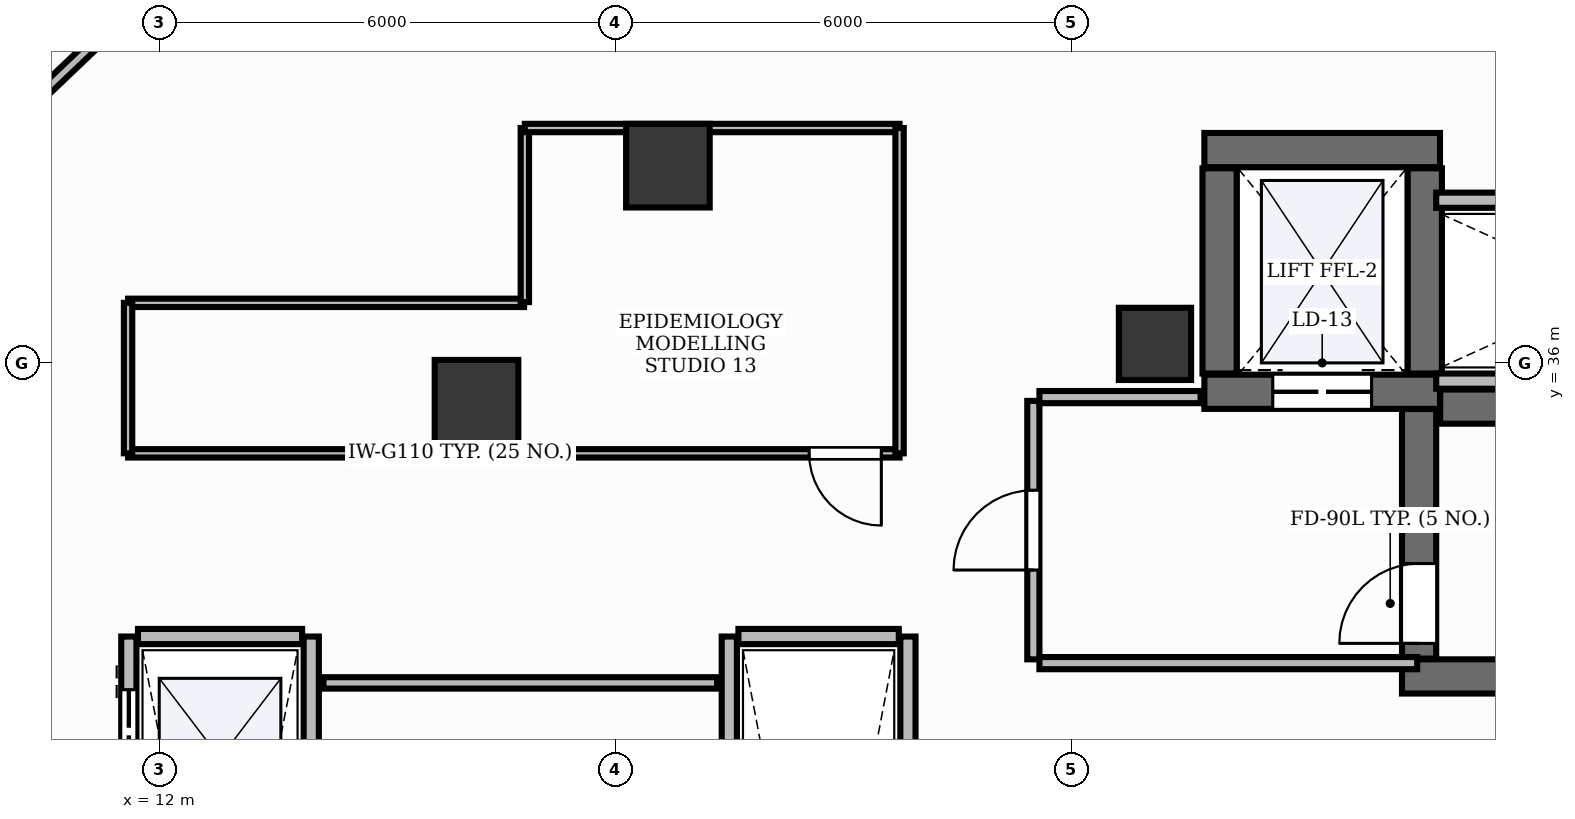
"""IFC4 building model, lengths in metres.
Left out: names, types, materials, properties, quantities, classifications, styles, units other than length and angle.
Written with IfcOpenShell. Run it as: python <this file> out.ifc"""

import sys

from ifc_helpers import new_model, si_unit, direction, frame, frame_2d, origin, origin_2d, place, context, subcontext, project, spatial, rectangle, extrude, element, fill, save


model = new_model("IFC4")
c1 = context("Model", 3, precision=1e-05, world=origin(), true_north=direction((0.0, 1.0)))
c2 = subcontext(c1, "Body", "Model", "MODEL_VIEW")
j1 = project(units=[si_unit("LENGTHUNIT", "METRE"), si_unit("PLANEANGLEUNIT", "RADIAN")], contexts=[c1])
p1 = place(None, origin())
s1 = spatial("IfcSite", under=j1, at=p1, CompositionType="ELEMENT")
p2 = place(p1, origin())
s2 = spatial("IfcBuilding", under=s1, at=p2, CompositionType="ELEMENT")
p3 = place(p2, frame((0.0, 0.0, 72.0)))
s3 = spatial("IfcBuildingStorey", under=s2, at=p3, CompositionType="ELEMENT", Elevation=72.0)
p4 = place(p3, frame((28.852, 35.425, 0.0), z_axis=(0.0, 0.0, 1.0), x_axis=(1.0, 0.0, 0.0)))
e1 = element("IfcWall", 1, at=p4, inside=s3, PredefinedType="SHEAR", context=c2, shape_type="SweptSolid", body=[
    extrude(rectangle(XDim=8.248, YDim=0.45, at=frame_2d((4.124, 0.0))), origin(), (0.0, 0.0, 1.0), 3.9),
])
p5 = place(p3, frame((28.35, 31.875, 0.0), z_axis=(0.0, 0.0, 1.0), x_axis=(1.0, 0.0, 0.0)))
e2 = element("IfcWall", 2, at=p5, inside=s3, PredefinedType="SHEAR", context=c2, shape_type="SweptSolid", body=[
    extrude(rectangle(XDim=8.75, YDim=0.45, at=frame_2d((4.375, 0.0))), origin(), (0.0, 0.0, 1.0), 3.9),
])
p6 = place(p3, frame((28.575, 32.11, 0.0), z_axis=(0.0, 0.0, 1.0), x_axis=(0.0, 1.0, 0.0)))
e3 = element("IfcWall", 3, at=p6, inside=s3, PredefinedType="SHEAR", context=c2, shape_type="SweptSolid", body=[
    extrude(rectangle(XDim=3.283, YDim=0.45, at=frame_2d((1.642, 0.0))), origin(), (0.0, 0.0, 1.0), 3.9),
])
p7 = place(p6, frame((0.2, 0.0, 0.0)))
e4 = element("IfcOpeningElement", 4, at=p7, cuts=e3, PredefinedType="OPENING", context=c2, shape_type="SweptSolid", body=[
    extrude(rectangle(XDim=1.05, YDim=2.15, at=frame_2d((0.525, 1.075))), frame((0.0, 0.24, 0.0), z_axis=(0.0, -1.0, 0.0), x_axis=(1.0, 0.0, 0.0)), (0.0, 0.0, 1.0), 0.48),
])
p8 = place(p3, frame((25.75, 38.8, 0.0), z_axis=(0.0, 0.0, 1.0), x_axis=(1.0, 0.0, 0.0)))
e5 = element("IfcWall", 5, at=p8, inside=s3, PredefinedType="SHEAR", context=c2, shape_type="SweptSolid", body=[
    extrude(rectangle(XDim=3.1, YDim=0.45, at=frame_2d((1.55, 0.0))), origin(), (0.0, 0.0, 1.0), 3.9),
])
p9 = place(p3, frame((25.75, 35.62, 0.0), z_axis=(0.0, 0.0, 1.0), x_axis=(1.0, 0.0, 0.0)))
e6 = element("IfcWall", 6, at=p9, inside=s3, PredefinedType="SHEAR", context=c2, shape_type="SweptSolid", body=[
    extrude(rectangle(XDim=3.1, YDim=0.45, at=frame_2d((1.55, 0.0))), origin(), (0.0, 0.0, 1.0), 3.9),
])
p10 = place(p9, frame((0.9, 0.0, 0.0)))
e7 = element("IfcOpeningElement", 7, at=p10, cuts=e6, PredefinedType="OPENING", context=c2, shape_type="SweptSolid", body=[
    extrude(rectangle(XDim=1.3, YDim=2.2, at=frame_2d((0.65, 1.1))), frame((0.0, 0.24, 0.0), z_axis=(0.0, -1.0, 0.0), x_axis=(1.0, 0.0, 0.0)), (0.0, 0.0, 1.0), 0.48),
])
for number, where, z_axis, x_axis in (
    (8, (25.95, 35.86, 0.0), (0.0, 0.0, 1.0), (0.0, 1.0, 0.0)),
    (9, (28.65, 35.86, 0.0), (0.0, 0.0, 1.0), (0.0, 1.0, 0.0)),
):
    element("IfcWall", number, at=place(p3, frame(where, z_axis=z_axis, x_axis=x_axis)), inside=s3, PredefinedType="SHEAR", context=c2, shape_type="SweptSolid", body=[
        extrude(rectangle(XDim=2.7, YDim=0.45, at=frame_2d((1.35, 0.0))), origin(), (0.0, 0.0, 1.0), 3.9),
    ])
p11 = place(p3, frame((25.1, 36.25, -0.0), z_axis=(0.0, 0.0, 1.0), x_axis=(1.0, 0.0, 0.0)))
e10 = element("IfcColumn", 10, at=p11, inside=s3, PredefinedType="PILASTER", context=c2, shape_type="SweptSolid", body=[
    extrude(rectangle(XDim=0.95, YDim=0.95, at=origin_2d()), origin(), (0.0, 0.0, 1.0), 3.901),
])
for number, where, z_axis, x_axis in (
    (11, (18.692, 38.595, -0.0), (0.0, 0.0, 1.0), (1.0, 0.0, 0.0)),
    (12, (16.174, 35.489, -0.0), (0.0, 0.0, 1.0), (1.0, 0.0, 0.0)),
):
    element("IfcColumn", number, at=place(p3, frame(where, z_axis=z_axis, x_axis=x_axis)), inside=s3, PredefinedType="COLUMN", context=c2, shape_type="SweptSolid", body=[
        extrude(rectangle(XDim=1.1, YDim=1.1, at=origin_2d()), origin(), (0.0, 0.0, 1.0), 3.901),
    ])
p12 = place(p3, frame((11.6, 21.6, 0.0), z_axis=(0.0, 0.0, 1.0), x_axis=(0.0, 1.0, 0.0)))
e13 = element("IfcWall", 13, at=p12, inside=s3, PredefinedType="PARTITIONING", context=c2, shape_type="SweptSolid", body=[
    extrude(rectangle(XDim=10.8, YDim=0.2, at=frame_2d((5.4, 0.0))), origin(), (0.0, 0.0, 1.0), 2.91),
])
p13 = place(p12, frame((0.9, 0.0, 0.0)))
e14 = element("IfcOpeningElement", 14, at=p13, cuts=e13, PredefinedType="OPENING", context=c2, shape_type="SweptSolid", body=[
    extrude(rectangle(XDim=1.1, YDim=2.2, at=frame_2d((0.55, 1.1))), frame((0.0, 0.115, 0.0), z_axis=(0.0, -1.0, 0.0), x_axis=(1.0, 0.0, 0.0)), (0.0, 0.0, 1.0), 0.23),
])
p14 = place(p12, frame((3.6, 0.0, 0.0)))
e15 = element("IfcOpeningElement", 15, at=p14, cuts=e13, PredefinedType="OPENING", context=c2, shape_type="SweptSolid", body=[
    extrude(rectangle(XDim=1.1, YDim=2.2, at=frame_2d((0.55, 1.1))), frame((0.0, 0.115, 0.0), z_axis=(0.0, -1.0, 0.0), x_axis=(1.0, 0.0, 0.0)), (0.0, 0.0, 1.0), 0.23),
])
p15 = place(p12, frame((6.3, 0.0, 0.0)))
e16 = element("IfcOpeningElement", 16, at=p15, cuts=e13, PredefinedType="OPENING", context=c2, shape_type="SweptSolid", body=[
    extrude(rectangle(XDim=1.1, YDim=2.2, at=frame_2d((0.55, 1.1))), frame((0.0, 0.115, 0.0), z_axis=(0.0, -1.0, 0.0), x_axis=(1.0, 0.0, 0.0)), (0.0, 0.0, 1.0), 0.23),
])
p16 = place(p12, frame((9.0, 0.0, 0.0)))
e17 = element("IfcOpeningElement", 17, at=p16, cuts=e13, PredefinedType="OPENING", context=c2, shape_type="SweptSolid", body=[
    extrude(rectangle(XDim=1.1, YDim=2.2, at=frame_2d((0.55, 1.1))), frame((0.0, 0.115, 0.0), z_axis=(0.0, -1.0, 0.0), x_axis=(1.0, 0.0, 0.0)), (0.0, 0.0, 1.0), 0.23),
])
p17 = place(p3, frame((14.0, 21.6, 0.0), z_axis=(0.0, 0.0, 1.0), x_axis=(0.0, 1.0, 0.0)))
e18 = element("IfcWall", 18, at=p17, inside=s3, PredefinedType="PARTITIONING", context=c2, shape_type="SweptSolid", body=[
    extrude(rectangle(XDim=10.8, YDim=0.2, at=frame_2d((5.4, 0.0))), origin(), (0.0, 0.0, 1.0), 2.91),
])
p18 = place(p3, frame((11.72, 32.4, 0.0), z_axis=(0.0, 0.0, 1.0), x_axis=(1.0, 0.0, 0.0)))
e19 = element("IfcWall", 19, at=p18, inside=s3, PredefinedType="PARTITIONING", context=c2, shape_type="SweptSolid", body=[
    extrude(rectangle(XDim=2.16, YDim=0.2, at=frame_2d((1.08, 0.0))), origin(), (0.0, 0.0, 1.0), 2.91),
])
for number, where, z_axis, x_axis in (
    (20, (19.5, 21.6, 0.0), (0.0, 0.0, 1.0), (0.0, 1.0, 0.0)),
    (21, (21.85, 21.6, 0.0), (0.0, 0.0, 1.0), (0.0, 1.0, 0.0)),
):
    element("IfcWall", number, at=place(p3, frame(where, z_axis=z_axis, x_axis=x_axis)), inside=s3, PredefinedType="PARTITIONING", context=c2, shape_type="SweptSolid", body=[
        extrude(rectangle(XDim=10.8, YDim=0.2, at=frame_2d((5.4, 0.0))), origin(), (0.0, 0.0, 1.0), 2.91),
    ])
p19 = place(p3, frame((19.62, 32.4, 0.0), z_axis=(0.0, 0.0, 1.0), x_axis=(1.0, 0.0, 0.0)))
e22 = element("IfcWall", 22, at=p19, inside=s3, PredefinedType="PARTITIONING", context=c2, shape_type="SweptSolid", body=[
    extrude(rectangle(XDim=2.11, YDim=0.2, at=frame_2d((1.055, 0.0))), origin(), (0.0, 0.0, 1.0), 2.91),
])
for number, where, z_axis, x_axis in (
    (23, (28.8, 35.76, 0.0), (0.0, 0.0, 1.0), (1.0, 0.0, 0.0)),
    (24, (28.8, 38.14, 0.0), (0.0, 0.0, 1.0), (1.0, 0.0, 0.0)),
):
    element("IfcWall", number, at=place(p3, frame(where, z_axis=z_axis, x_axis=x_axis)), inside=s3, PredefinedType="PARTITIONING", context=c2, shape_type="SweptSolid", body=[
        extrude(rectangle(XDim=4.57, YDim=0.2, at=frame_2d((2.285, 0.0))), origin(), (0.0, 0.0, 1.0), 2.91),
    ])
p20 = place(p3, frame((23.5, 32.1, 0.0), z_axis=(0.0, 0.0, 1.0), x_axis=(0.0, 1.0, 0.0)))
e25 = element("IfcWall", 25, at=p20, inside=s3, PredefinedType="PARTITIONING", context=c2, shape_type="SweptSolid", body=[
    extrude(rectangle(XDim=3.4, YDim=0.16, at=frame_2d((1.7, 0.0))), origin(), (0.0, 0.0, 1.0), 2.91),
])
p21 = place(p20, frame((1.175, 0.0, 0.0)))
e26 = element("IfcOpeningElement", 26, at=p21, cuts=e25, PredefinedType="OPENING", context=c2, shape_type="SweptSolid", body=[
    extrude(rectangle(XDim=1.05, YDim=2.15, at=frame_2d((0.525, 1.075))), frame((0.0, 0.095, 0.0), z_axis=(0.0, -1.0, 0.0), x_axis=(1.0, 0.0, 0.0)), (0.0, 0.0, 1.0), 0.19),
])
p22 = place(p3, frame((23.58, 32.05, 0.0), z_axis=(0.0, 0.0, 1.0), x_axis=(1.0, 0.0, 0.0)))
e27 = element("IfcWall", 27, at=p22, inside=s3, PredefinedType="PARTITIONING", context=c2, shape_type="SweptSolid", body=[
    extrude(rectangle(XDim=4.97, YDim=0.16, at=frame_2d((2.485, 0.0))), origin(), (0.0, 0.0, 1.0), 2.91),
])
p23 = place(p3, frame((23.58, 35.55, 0.0), z_axis=(0.0, 0.0, 1.0), x_axis=(1.0, 0.0, 0.0)))
e28 = element("IfcWall", 28, at=p23, inside=s3, PredefinedType="PARTITIONING", context=c2, shape_type="SweptSolid", body=[
    extrude(rectangle(XDim=2.12, YDim=0.16, at=frame_2d((1.06, 0.0))), origin(), (0.0, 0.0, 1.0), 2.91),
])
p24 = place(p3, frame((21.74, 34.81, 0.0), z_axis=(0.0, 0.0, 1.0), x_axis=(-1.0, 0.0, 0.0)))
e29 = element("IfcWall", 29, at=p24, inside=s3, PredefinedType="MOVABLE", context=c2, shape_type="SweptSolid", body=[
    extrude(rectangle(XDim=10.15, YDim=0.11, at=frame_2d((5.075, 0.0))), origin(), (0.0, 0.0, 1.0), 2.91),
])
p25 = place(p24, frame((0.24, 0.0, 0.0)))
e30 = element("IfcOpeningElement", 30, at=p25, cuts=e29, PredefinedType="OPENING", context=c2, shape_type="SweptSolid", body=[
    extrude(rectangle(XDim=0.95, YDim=2.15, at=frame_2d((0.475, 1.075))), frame((0.0, 0.07, 0.0), z_axis=(0.0, -1.0, 0.0), x_axis=(1.0, 0.0, 0.0)), (0.0, 0.0, 1.0), 0.14),
])
p26 = place(p3, frame((14.16, 31.79, 0.0), z_axis=(0.0, 0.0, 1.0), x_axis=(1.0, 0.0, 0.0)))
e31 = element("IfcWall", 31, at=p26, inside=s3, PredefinedType="PARTITIONING", context=c2, shape_type="SweptSolid", body=[
    extrude(rectangle(XDim=5.18, YDim=0.15, at=frame_2d((2.59, 0.0))), origin(), (0.0, 0.0, 1.0), 2.91),
])
p27 = place(p3, frame((11.59, 36.79, 0.0), z_axis=(0.0, 0.0, 1.0), x_axis=(1.0, 0.0, 0.0)))
e32 = element("IfcWall", 32, at=p27, inside=s3, PredefinedType="MOVABLE", context=c2, shape_type="SweptSolid", body=[
    extrude(rectangle(XDim=5.21, YDim=0.11, at=frame_2d((2.605, 0.0))), origin(), (0.0, 0.0, 1.0), 2.91),
])
p28 = place(p3, frame((16.81, 36.8, 0.0), z_axis=(0.0, 0.0, 1.0), x_axis=(0.0, 1.0, 0.0)))
e33 = element("IfcWall", 33, at=p28, inside=s3, PredefinedType="MOVABLE", context=c2, shape_type="SweptSolid", body=[
    extrude(rectangle(XDim=2.29, YDim=0.11, at=frame_2d((1.145, 0.0))), origin(), (0.0, 0.0, 1.0), 2.91),
])
p29 = place(p3, frame((16.81, 39.09, 0.0), z_axis=(0.0, 0.0, 1.0), x_axis=(1.0, 0.0, 0.0)))
e34 = element("IfcWall", 34, at=p29, inside=s3, PredefinedType="MOVABLE", context=c2, shape_type="SweptSolid", body=[
    extrude(rectangle(XDim=4.93, YDim=0.11, at=frame_2d((2.465, 0.0))), origin(), (0.0, 0.0, 1.0), 2.91),
])
p30 = place(p3, frame((21.74, 39.09, 0.0), z_axis=(0.0, 0.0, 1.0), x_axis=(0.0, -1.0, 0.0)))
e35 = element("IfcWall", 35, at=p30, inside=s3, PredefinedType="MOVABLE", context=c2, shape_type="SweptSolid", body=[
    extrude(rectangle(XDim=4.28, YDim=0.11, at=frame_2d((2.14, 0.0))), origin(), (0.0, 0.0, 1.0), 2.91),
])
p31 = place(p3, frame((11.59, 34.81, 0.0), z_axis=(0.0, 0.0, 1.0), x_axis=(0.0, 1.0, 0.0)))
e36 = element("IfcWall", 36, at=p31, inside=s3, PredefinedType="MOVABLE", context=c2, shape_type="SweptSolid", body=[
    extrude(rectangle(XDim=1.98, YDim=0.11, at=frame_2d((0.99, 0.0))), origin(), (0.0, 0.0, 1.0), 2.91),
])
p32 = place(p3, frame((11.693, 40.727, 0.0), z_axis=(0.0, 0.0, 1.0), x_axis=(-0.723683526017, -0.690131983154, 0.0)))
e37 = element("IfcWall", 37, at=p32, inside=s3, PredefinedType="PARTITIONING", context=c2, shape_type="SweptSolid", body=[
    extrude(rectangle(XDim=2.94, YDim=0.15, at=frame_2d((1.47, 0.0))), origin(), (0.0, 0.0, 1.0), 2.91),
])
p33 = place(p7, origin())
e38 = element("IfcDoor", 38, at=p33, inside=s3, OperationType="SINGLE_SWING_LEFT", PredefinedType="DOOR", context=c2, shape_type="SweptSolid", body=[
    extrude(rectangle(XDim=1.05, YDim=2.15, at=frame_2d((0.525, 1.075))), frame((0.0, 0.025, 0.0), z_axis=(0.0, -1.0, 0.0), x_axis=(1.0, 0.0, 0.0)), (0.0, 0.0, 1.0), 0.05),
])
fill(e4, e38)
p34 = place(p16, origin())
e39 = element("IfcDoor", 39, at=p34, inside=s3, OperationType="DOUBLE_DOOR_SLIDING", PredefinedType="DOOR", context=c2, shape_type="SweptSolid", body=[
    extrude(rectangle(XDim=1.1, YDim=2.2, at=frame_2d((0.55, 1.1))), frame((0.0, 0.025, 0.0), z_axis=(0.0, -1.0, 0.0), x_axis=(1.0, 0.0, 0.0)), (0.0, 0.0, 1.0), 0.05),
])
fill(e17, e39)
p35 = place(p10, origin())
e40 = element("IfcDoor", 40, at=p35, inside=s3, OperationType="DOUBLE_DOOR_SLIDING", PredefinedType="DOOR", context=c2, shape_type="SweptSolid", body=[
    extrude(rectangle(XDim=1.3, YDim=2.2, at=frame_2d((0.65, 1.1))), frame((0.0, 0.025, 0.0), z_axis=(0.0, -1.0, 0.0), x_axis=(1.0, 0.0, 0.0)), (0.0, 0.0, 1.0), 0.05),
])
fill(e7, e40)
p36 = place(p21, origin())
e41 = element("IfcDoor", 41, at=p36, inside=s3, OperationType="SINGLE_SWING_LEFT", PredefinedType="DOOR", context=c2, shape_type="SweptSolid", body=[
    extrude(rectangle(XDim=1.05, YDim=2.15, at=frame_2d((0.525, 1.075))), frame((0.0, 0.025, 0.0), z_axis=(0.0, -1.0, 0.0), x_axis=(1.0, 0.0, 0.0)), (0.0, 0.0, 1.0), 0.05),
])
fill(e26, e41)
p37 = place(p25, origin())
e42 = element("IfcDoor", 42, at=p37, inside=s3, OperationType="SINGLE_SWING_LEFT", PredefinedType="DOOR", context=c2, shape_type="SweptSolid", body=[
    extrude(rectangle(XDim=0.95, YDim=2.15, at=frame_2d((0.475, 1.075))), frame((0.0, 0.025, 0.0), z_axis=(0.0, -1.0, 0.0), x_axis=(1.0, 0.0, 0.0)), (0.0, 0.0, 1.0), 0.05),
])
fill(e30, e42)
save(model, sys.argv[1])
